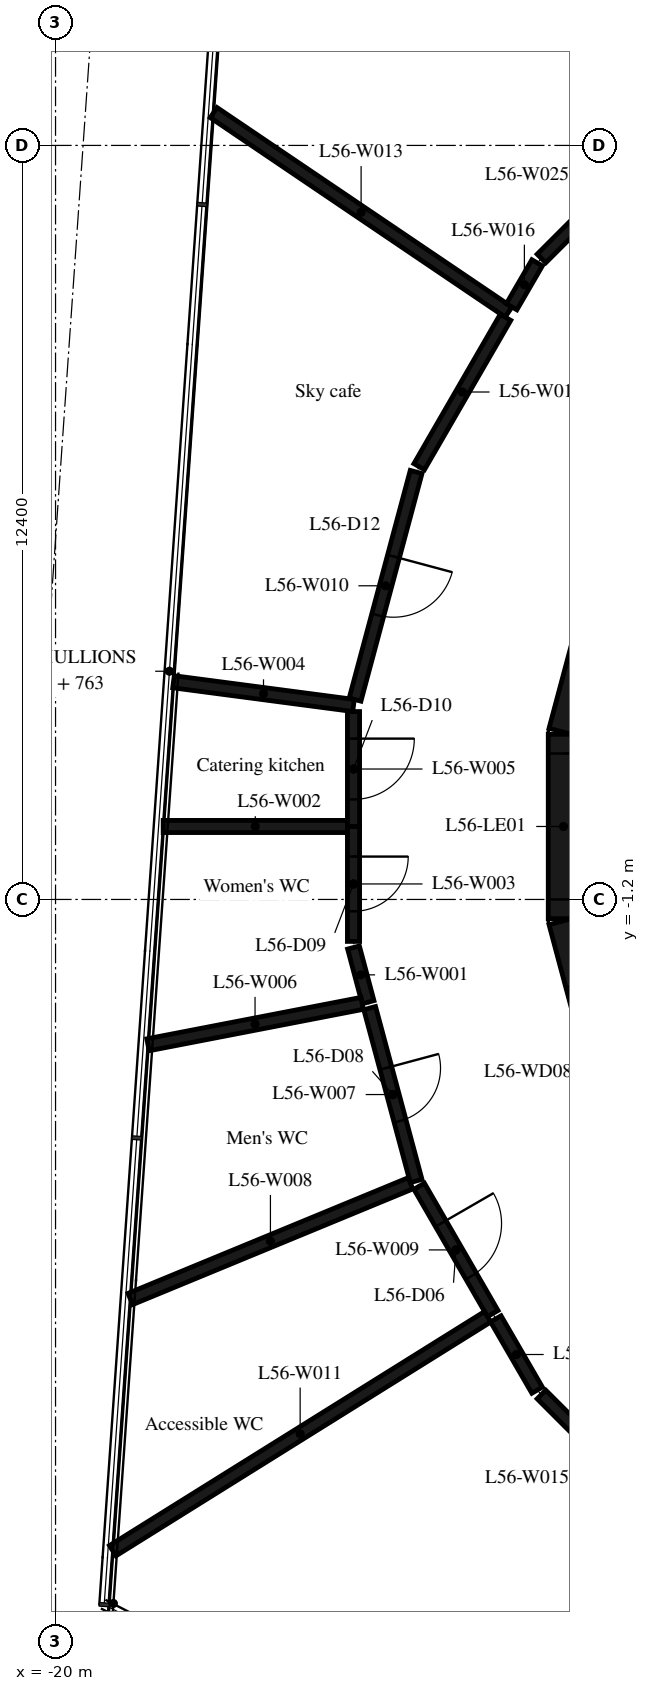
"""IFC4 building model, lengths in metres.
Left out: names, types, materials, properties, quantities, classifications, styles, units other than length and angle.
Written with IfcOpenShell. Run it as: python <this file> out.ifc"""

import sys

from ifc_helpers import new_model, si_unit, direction, frame, frame_2d, origin, place, context, subcontext, project, spatial, rectangle, extrude, element, fill, save


model = new_model("IFC4")
c1 = context("Model", 3, precision=1e-05, world=origin(), true_north=direction((0.0, 1.0)))
c2 = subcontext(c1, "Body", "Model", "MODEL_VIEW")
j1 = project(units=[si_unit("LENGTHUNIT", "METRE"), si_unit("PLANEANGLEUNIT", "RADIAN")], contexts=[c1])
p1 = place(None, origin())
s1 = spatial("IfcSite", under=j1, at=p1, CompositionType="ELEMENT")
p2 = place(p1, origin())
s2 = spatial("IfcBuilding", under=s1, at=p2, CompositionType="ELEMENT")
p3 = place(p2, frame((0.0, 0.0, 219.9)))
s3 = spatial("IfcBuildingStorey", under=s2, at=p3, CompositionType="ELEMENT", Elevation=219.9)
p4 = place(p3, frame((-10.858, 4.479, 0.0), z_axis=(0.0, 0.0, 1.0), x_axis=(-0.258734743916, -0.965948410781, 0.0)))
e1 = element("IfcWall", 1, at=p4, inside=s3, PredefinedType="SHEAR", context=c2, shape_type="SweptSolid", body=[
    extrude(rectangle(XDim=3.033, YDim=0.5, at=frame_2d((1.516, 0.0))), origin(), (0.0, 0.0, 1.0), 6.35),
])
p5 = place(p3, frame((-11.647, 1.516, 0.0), z_axis=(0.0, 0.0, 1.0), x_axis=(0.0, -1.0, 0.0)))
e2 = element("IfcWall", 2, at=p5, inside=s3, PredefinedType="SHEAR", context=c2, shape_type="SweptSolid", body=[
    extrude(rectangle(XDim=3.033, YDim=0.5, at=frame_2d((1.516, 0.0))), origin(), (0.0, 0.0, 1.0), 6.35),
])
p6 = place(p5, frame((0.316, 0.0, 0.0)))
e3 = element("IfcOpeningElement", 3, at=p6, cuts=e2, PredefinedType="OPENING", context=c2, shape_type="SweptSolid", body=[
    extrude(rectangle(XDim=2.4, YDim=2.1, at=frame_2d((1.2, 1.05))), frame((0.0, 0.26, 0.0), z_axis=(0.0, -1.0, 0.0), x_axis=(1.0, 0.0, 0.0)), (0.0, 0.0, 1.0), 0.52),
])
p7 = place(p3, frame((-11.643, -1.55, 0.0), z_axis=(0.0, 0.0, 1.0), x_axis=(0.258734743916, -0.965948410781, 0.0)))
e4 = element("IfcWall", 4, at=p7, inside=s3, PredefinedType="SHEAR", context=c2, shape_type="SweptSolid", body=[
    extrude(rectangle(XDim=3.033, YDim=0.5, at=frame_2d((1.516, 0.0))), origin(), (0.0, 0.0, 1.0), 6.35),
])
p8 = place(p7, frame((1.066, 0.0, 0.0)))
e5 = element("IfcOpeningElement", 5, at=p8, cuts=e4, PredefinedType="OPENING", context=c2, shape_type="SweptSolid", body=[
    extrude(rectangle(XDim=0.9, YDim=2.1, at=frame_2d((0.45, 1.05))), frame((0.0, 0.26, 0.0), z_axis=(0.0, -1.0, 0.0), x_axis=(1.0, 0.0, 0.0)), (0.0, 0.0, 1.0), 0.52),
])
p9 = place(p3, frame((-15.1, -1.99, 0.0), z_axis=(0.0, 0.0, 1.0), x_axis=(0.257678965997, -0.966230588671, 0.0)))
e6 = element("IfcWall", 6, at=p9, inside=s3, PredefinedType="PARTITIONING", context=c2, shape_type="SweptSolid", body=[
    extrude(rectangle(XDim=0.931, YDim=0.2, at=frame_2d((0.466, 0.0))), origin(), (0.0, 0.0, 1.0), 6.35),
])
p10 = place(p3, frame((-15.2, 0.0, 0.0), z_axis=(0.0, 0.0, 1.0), x_axis=(-1.0, 0.0, 0.0)))
e7 = element("IfcWall", 7, at=p10, inside=s3, PredefinedType="PARTITIONING", context=c2, shape_type="SweptSolid", body=[
    extrude(rectangle(XDim=3.03, YDim=0.2, at=frame_2d((1.515, 0.0))), origin(), (0.0, 0.0, 1.0), 6.35),
])
p11 = place(p3, frame((-15.1, 0.0, 0.0), z_axis=(0.0, 0.0, 1.0), x_axis=(0.0, -1.0, 0.0)))
e8 = element("IfcWall", 8, at=p11, inside=s3, PredefinedType="PARTITIONING", context=c2, shape_type="SweptSolid", body=[
    extrude(rectangle(XDim=1.89, YDim=0.2, at=frame_2d((0.945, 0.0))), origin(), (0.0, 0.0, 1.0), 6.35),
])
p12 = place(p11, frame((0.495, 0.0, 0.0)))
e9 = element("IfcOpeningElement", 9, at=p12, cuts=e8, PredefinedType="OPENING", context=c2, shape_type="SweptSolid", body=[
    extrude(rectangle(XDim=0.9, YDim=2.1, at=frame_2d((0.45, 1.05))), frame((0.0, 0.11, 0.0), z_axis=(0.0, -1.0, 0.0), x_axis=(1.0, 0.0, 0.0)), (0.0, 0.0, 1.0), 0.22),
])
p13 = place(p3, frame((-15.1, 1.99, 0.0), z_axis=(0.0, 0.0, 1.0), x_axis=(-0.99143591564, 0.130594123827, 0.0)))
e10 = element("IfcWall", 10, at=p13, inside=s3, PredefinedType="PARTITIONING", context=c2, shape_type="SweptSolid", body=[
    extrude(rectangle(XDim=2.986, YDim=0.2, at=frame_2d((1.493, 0.0))), origin(), (0.0, 0.0, 1.0), 6.35),
])
p14 = place(p3, frame((-15.1, 1.89, 0.0), z_axis=(0.0, 0.0, 1.0), x_axis=(0.0, -1.0, 0.0)))
e11 = element("IfcWall", 11, at=p14, inside=s3, PredefinedType="PARTITIONING", context=c2, shape_type="SweptSolid", body=[
    extrude(rectangle(XDim=1.89, YDim=0.2, at=frame_2d((0.945, 0.0))), origin(), (0.0, 0.0, 1.0), 6.35),
])
p15 = place(p14, frame((0.445, 0.0, 0.0)))
e12 = element("IfcOpeningElement", 12, at=p15, cuts=e11, PredefinedType="OPENING", context=c2, shape_type="SweptSolid", body=[
    extrude(rectangle(XDim=1.0, YDim=2.1, at=frame_2d((0.5, 1.05))), frame((0.0, 0.11, 0.0), z_axis=(0.0, -1.0, 0.0), x_axis=(1.0, 0.0, 0.0)), (0.0, 0.0, 1.0), 0.22),
])
p16 = place(p3, frame((-14.958, -2.909, 0.0), z_axis=(0.0, 0.0, 1.0), x_axis=(-0.981804418679, -0.189894927426, 0.0)))
e13 = element("IfcWall", 13, at=p16, inside=s3, PredefinedType="PARTITIONING", context=c2, shape_type="SweptSolid", body=[
    extrude(rectangle(XDim=3.587, YDim=0.2, at=frame_2d((1.793, 0.0))), origin(), (0.0, 0.0, 1.0), 6.35),
])
p17 = place(p3, frame((-14.834, -2.987, 0.0), z_axis=(0.0, 0.0, 1.0), x_axis=(0.259453048497, -0.965755722544, 0.0)))
e14 = element("IfcWall", 14, at=p17, inside=s3, PredefinedType="PARTITIONING", context=c2, shape_type="SweptSolid", body=[
    extrude(rectangle(XDim=2.944, YDim=0.2, at=frame_2d((1.472, 0.0))), origin(), (0.0, 0.0, 1.0), 6.35),
])
p18 = place(p17, frame((1.022, 0.0, 0.0)))
e15 = element("IfcOpeningElement", 15, at=p18, cuts=e14, PredefinedType="OPENING", context=c2, shape_type="SweptSolid", body=[
    extrude(rectangle(XDim=0.9, YDim=2.1, at=frame_2d((0.45, 1.05))), frame((0.0, 0.11, 0.0), z_axis=(0.0, -1.0, 0.0), x_axis=(1.0, 0.0, 0.0)), (0.0, 0.0, 1.0), 0.22),
])
p19 = place(p3, frame((-14.162, -5.868, 0.0), z_axis=(0.0, 0.0, 1.0), x_axis=(-0.924354193641, -0.381535482883, 0.0)))
e16 = element("IfcWall", 16, at=p19, inside=s3, PredefinedType="PARTITIONING", context=c2, shape_type="SweptSolid", body=[
    extrude(rectangle(XDim=4.985, YDim=0.2, at=frame_2d((2.492, 0.0))), origin(), (0.0, 0.0, 1.0), 6.35),
])
p20 = place(p3, frame((-14.02, -5.917, 0.0), z_axis=(0.0, 0.0, 1.0), x_axis=(0.500395345151, -0.865797030805, 0.0)))
e17 = element("IfcWall", 17, at=p20, inside=s3, PredefinedType="PARTITIONING", context=c2, shape_type="SweptSolid", body=[
    extrude(rectangle(XDim=2.418, YDim=0.2, at=frame_2d((1.209, 0.0))), origin(), (0.0, 0.0, 1.0), 6.35),
])
p21 = place(p20, frame((0.709, 0.0, 0.0)))
e18 = element("IfcOpeningElement", 18, at=p21, cuts=e17, PredefinedType="OPENING", context=c2, shape_type="SweptSolid", body=[
    extrude(rectangle(XDim=1.0, YDim=2.1, at=frame_2d((0.5, 1.05))), frame((0.0, 0.11, 0.0), z_axis=(0.0, -1.0, 0.0), x_axis=(1.0, 0.0, 0.0)), (0.0, 0.0, 1.0), 0.22),
])
p22 = place(p3, frame((-14.07, 5.83, 0.0), z_axis=(0.0, 0.0, 1.0), x_axis=(-0.259026804199, -0.965870133458, 0.0)))
e19 = element("IfcWall", 19, at=p22, inside=s3, PredefinedType="PARTITIONING", context=c2, shape_type="SweptSolid", body=[
    extrude(rectangle(XDim=3.876, YDim=0.2, at=frame_2d((1.938, 0.0))), origin(), (0.0, 0.0, 1.0), 6.35),
])
p23 = place(p22, frame((1.438, 0.0, 0.0)))
e20 = element("IfcOpeningElement", 20, at=p23, cuts=e19, PredefinedType="OPENING", context=c2, shape_type="SweptSolid", body=[
    extrude(rectangle(XDim=1.0, YDim=2.1, at=frame_2d((0.5, 1.05))), frame((0.0, 0.11, 0.0), z_axis=(0.0, -1.0, 0.0), x_axis=(1.0, 0.0, 0.0)), (0.0, 0.0, 1.0), 0.22),
])
p24 = place(p3, frame((-12.895, -8.063, 0.0), z_axis=(0.0, 0.0, 1.0), x_axis=(-0.848392535646, -0.529367646782, 0.0)))
e21 = element("IfcWall", 21, at=p24, inside=s3, PredefinedType="PARTITIONING", context=c2, shape_type="SweptSolid", body=[
    extrude(rectangle(XDim=7.267, YDim=0.2, at=frame_2d((3.634, 0.0))), origin(), (0.0, 0.0, 1.0), 6.35),
])
p25 = place(p3, frame((-12.76, -8.096, 0.0), z_axis=(0.0, 0.0, 1.0), x_axis=(0.501171091484, -0.865348217229, 0.0)))
e22 = element("IfcWall", 22, at=p25, inside=s3, PredefinedType="PARTITIONING", context=c2, shape_type="SweptSolid", body=[
    extrude(rectangle(XDim=1.356, YDim=0.2, at=frame_2d((0.678, 0.0))), origin(), (0.0, 0.0, 1.0), 6.35),
])
p26 = place(p3, frame((-12.55, 8.46, 0.0), z_axis=(0.0, 0.0, 1.0), x_axis=(-0.82834317232, 0.560221017877, 0.0)))
e23 = element("IfcWall", 23, at=p26, inside=s3, PredefinedType="PARTITIONING", context=c2, shape_type="SweptSolid", body=[
    extrude(rectangle(XDim=5.855, YDim=0.2, at=frame_2d((2.927, 0.0))), origin(), (0.0, 0.0, 1.0), 6.35),
])
p27 = place(p3, frame((-12.6, 8.374, 0.0), z_axis=(0.0, 0.0, 1.0), x_axis=(-0.500357861848, -0.865818693542, 0.0)))
e24 = element("IfcWall", 24, at=p27, inside=s3, PredefinedType="PARTITIONING", context=c2, shape_type="SweptSolid", body=[
    extrude(rectangle(XDim=2.838, YDim=0.2, at=frame_2d((1.419, 0.0))), origin(), (0.0, 0.0, 1.0), 6.35),
])
p28 = place(p3, frame((-12.009, -9.341, 0.0), z_axis=(0.0, 0.0, 1.0), x_axis=(0.707106781187, -0.707106781187, 0.0)))
e25 = element("IfcWall", 25, at=p28, inside=s3, PredefinedType="PARTITIONING", context=c2, shape_type="SweptSolid", body=[
    extrude(rectangle(XDim=3.874, YDim=0.2, at=frame_2d((1.937, 0.0))), origin(), (0.0, 0.0, 1.0), 6.35),
])
p29 = place(p28, frame((1.437, 0.0, 0.0)))
e26 = element("IfcOpeningElement", 26, at=p29, cuts=e25, PredefinedType="OPENING", context=c2, shape_type="SweptSolid", body=[
    extrude(rectangle(XDim=1.0, YDim=2.1, at=frame_2d((0.5, 1.05))), frame((0.0, 0.11, 0.0), z_axis=(0.0, -1.0, 0.0), x_axis=(1.0, 0.0, 0.0)), (0.0, 0.0, 1.0), 0.22),
])
p30 = place(p3, frame((-12.08, 9.27, 0.0), z_axis=(0.0, 0.0, 1.0), x_axis=(-0.501691883225, -0.865046388528, 0.0)))
e27 = element("IfcWall", 27, at=p30, inside=s3, PredefinedType="PARTITIONING", context=c2, shape_type="SweptSolid", body=[
    extrude(rectangle(XDim=0.836, YDim=0.2, at=frame_2d((0.418, 0.0))), origin(), (0.0, 0.0, 1.0), 6.35),
])
p31 = place(p3, frame((-9.27, 12.08, 0.0), z_axis=(0.0, 0.0, 1.0), x_axis=(-0.707106781187, -0.707106781187, 0.0)))
e28 = element("IfcWall", 28, at=p31, inside=s3, PredefinedType="PARTITIONING", context=c2, shape_type="SweptSolid", body=[
    extrude(rectangle(XDim=3.874, YDim=0.2, at=frame_2d((1.937, 0.0))), origin(), (0.0, 0.0, 1.0), 6.35),
])
p32 = place(p31, frame((1.437, 0.0, 0.0)))
e29 = element("IfcOpeningElement", 29, at=p32, cuts=e28, PredefinedType="OPENING", context=c2, shape_type="SweptSolid", body=[
    extrude(rectangle(XDim=1.0, YDim=2.1, at=frame_2d((0.5, 1.05))), frame((0.0, 0.11, 0.0), z_axis=(0.0, -1.0, 0.0), x_axis=(1.0, 0.0, 0.0)), (0.0, 0.0, 1.0), 0.22),
])
p33 = place(p3, frame((-9.24, -12.1, 0.0), z_axis=(0.0, 0.0, 1.0), x_axis=(-0.559771610151, -0.828646935956, 0.0)))
e30 = element("IfcWall", 30, at=p33, inside=s3, PredefinedType="PARTITIONING", context=c2, shape_type="SweptSolid", body=[
    extrude(rectangle(XDim=4.224, YDim=0.2, at=frame_2d((2.112, 0.0))), origin(), (0.0, 0.0, 1.0), 6.35),
])
p34 = place(p6, origin())
e31 = element("IfcDoor", 31, at=p34, inside=s3, OperationType="DOUBLE_DOOR_SINGLE_SWING", PredefinedType="DOOR", context=c2, shape_type="SweptSolid", body=[
    extrude(rectangle(XDim=2.4, YDim=2.1, at=frame_2d((1.2, 1.05))), frame((0.0, 0.025, 0.0), z_axis=(0.0, -1.0, 0.0), x_axis=(1.0, 0.0, 0.0)), (0.0, 0.0, 1.0), 0.05),
])
fill(e3, e31)
p35 = place(p21, origin())
e32 = element("IfcDoor", 32, at=p35, inside=s3, OperationType="SINGLE_SWING_LEFT", PredefinedType="DOOR", context=c2, shape_type="SweptSolid", body=[
    extrude(rectangle(XDim=1.0, YDim=2.1, at=frame_2d((0.5, 1.05))), frame((0.0, 0.025, 0.0), z_axis=(0.0, -1.0, 0.0), x_axis=(1.0, 0.0, 0.0)), (0.0, 0.0, 1.0), 0.05),
])
fill(e18, e32)
p36 = place(p18, origin())
e33 = element("IfcDoor", 33, at=p36, inside=s3, OperationType="SINGLE_SWING_LEFT", PredefinedType="DOOR", context=c2, shape_type="SweptSolid", body=[
    extrude(rectangle(XDim=0.9, YDim=2.1, at=frame_2d((0.45, 1.05))), frame((0.0, 0.025, 0.0), z_axis=(0.0, -1.0, 0.0), x_axis=(1.0, 0.0, 0.0)), (0.0, 0.0, 1.0), 0.05),
])
fill(e15, e33)
p37 = place(p12, origin())
e34 = element("IfcDoor", 34, at=p37, inside=s3, OperationType="SINGLE_SWING_LEFT", PredefinedType="DOOR", context=c2, shape_type="SweptSolid", body=[
    extrude(rectangle(XDim=0.9, YDim=2.1, at=frame_2d((0.45, 1.05))), frame((0.0, 0.025, 0.0), z_axis=(0.0, -1.0, 0.0), x_axis=(1.0, 0.0, 0.0)), (0.0, 0.0, 1.0), 0.05),
])
fill(e9, e34)
p38 = place(p15, origin())
e35 = element("IfcDoor", 35, at=p38, inside=s3, OperationType="SINGLE_SWING_LEFT", PredefinedType="DOOR", context=c2, shape_type="SweptSolid", body=[
    extrude(rectangle(XDim=1.0, YDim=2.1, at=frame_2d((0.5, 1.05))), frame((0.0, 0.025, 0.0), z_axis=(0.0, -1.0, 0.0), x_axis=(1.0, 0.0, 0.0)), (0.0, 0.0, 1.0), 0.05),
])
fill(e12, e35)
p39 = place(p23, origin())
e36 = element("IfcDoor", 36, at=p39, inside=s3, OperationType="SINGLE_SWING_LEFT", PredefinedType="DOOR", context=c2, shape_type="SweptSolid", body=[
    extrude(rectangle(XDim=1.0, YDim=2.1, at=frame_2d((0.5, 1.05))), frame((0.0, 0.025, 0.0), z_axis=(0.0, -1.0, 0.0), x_axis=(1.0, 0.0, 0.0)), (0.0, 0.0, 1.0), 0.05),
])
fill(e20, e36)
save(model, sys.argv[1])
